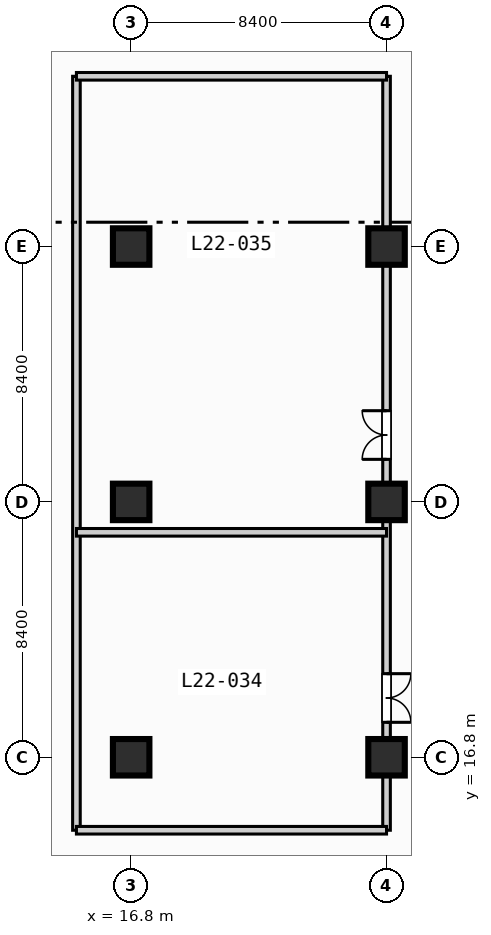
"""IFC4 building model, lengths in metres.
Left out: names, types, materials, properties, quantities, classifications, styles, units other than length and angle.
Written with IfcOpenShell. Run it as: python <this file> out.ifc"""

import sys

from ifc_helpers import new_model, si_unit, direction, frame, frame_2d, origin, origin_2d, place, context, subcontext, project, spatial, rectangle, extrude, element, fill, save


model = new_model("IFC4")
c1 = context("Model", 3, precision=1e-05, world=origin(), true_north=direction((0.0, 1.0)))
c2 = subcontext(c1, "Body", "Model", "MODEL_VIEW")
j1 = project(units=[si_unit("LENGTHUNIT", "METRE"), si_unit("PLANEANGLEUNIT", "RADIAN")], contexts=[c1])
p1 = place(None, origin())
s1 = spatial("IfcSite", under=j1, at=p1, CompositionType="ELEMENT")
p2 = place(p1, origin())
s2 = spatial("IfcBuilding", under=s1, at=p2, CompositionType="ELEMENT")
p3 = place(p2, frame((0.0, 0.0, 94.0)))
s3 = spatial("IfcBuildingStorey", under=s2, at=p3, CompositionType="ELEMENT", Elevation=94.0)
for number, where, z_axis, x_axis in (
    (1, (16.8, 16.8, 0.0), (0.0, 0.0, 1.0), (1.0, 0.0, 0.0)),
    (2, (16.8, 25.2, 0.0), (0.0, 0.0, 1.0), (1.0, 0.0, 0.0)),
    (3, (16.8, 33.6, 0.0), (0.0, 0.0, 1.0), (1.0, 0.0, 0.0)),
    (4, (25.2, 16.8, 0.0), (0.0, 0.0, 1.0), (1.0, 0.0, 0.0)),
    (5, (25.2, 25.2, 0.0), (0.0, 0.0, 1.0), (1.0, 0.0, 0.0)),
    (6, (25.2, 33.6, 0.0), (0.0, 0.0, 1.0), (1.0, 0.0, 0.0)),
):
    element("IfcColumn", number, at=place(p3, frame(where, z_axis=z_axis, x_axis=x_axis)), inside=s3, PredefinedType="COLUMN", context=c2, shape_type="SweptSolid", body=[
        extrude(rectangle(XDim=1.2, YDim=1.2, at=origin_2d()), origin(), (0.0, 0.0, 1.0), 6.0),
    ])
p4 = place(p3, frame((25.2, 14.4, 0.0), z_axis=(0.0, 0.0, 1.0), x_axis=(0.0, 1.0, 0.0)))
e7 = element("IfcWall", 7, at=p4, inside=s3, PredefinedType="SOLIDWALL", context=c2, shape_type="SweptSolid", body=[
    extrude(rectangle(XDim=24.8, YDim=0.25, at=frame_2d((12.4, 0.0))), origin(), (0.0, 0.0, 1.0), 5.0),
])
p5 = place(p4, frame((3.55, 0.0, 0.0)))
e8 = element("IfcOpeningElement", 8, at=p5, cuts=e7, PredefinedType="OPENING", context=c2, shape_type="SweptSolid", body=[
    extrude(rectangle(XDim=1.6, YDim=2.2, at=frame_2d((0.8, 1.1))), frame((0.0, 0.135, 0.0), z_axis=(0.0, -1.0, 0.0), x_axis=(1.0, 0.0, 0.0)), (0.0, 0.0, 1.0), 0.27),
])
p6 = place(p4, frame((12.2, 0.0, 0.0)))
e9 = element("IfcOpeningElement", 9, at=p6, cuts=e7, PredefinedType="OPENING", context=c2, shape_type="SweptSolid", body=[
    extrude(rectangle(XDim=1.6, YDim=2.2, at=frame_2d((0.8, 1.1))), frame((0.0, 0.135, 0.0), z_axis=(0.0, -1.0, 0.0), x_axis=(1.0, 0.0, 0.0)), (0.0, 0.0, 1.0), 0.27),
])
p7 = place(p3, frame((15.0, 14.4, 0.0), z_axis=(0.0, 0.0, 1.0), x_axis=(0.0, 1.0, 0.0)))
e10 = element("IfcWall", 10, at=p7, inside=s3, PredefinedType="SOLIDWALL", context=c2, shape_type="SweptSolid", body=[
    extrude(rectangle(XDim=24.8, YDim=0.25, at=frame_2d((12.4, 0.0))), origin(), (0.0, 0.0, 1.0), 5.75),
])
for number, where, z_axis, x_axis in (
    (11, (15.0, 14.4, 0.0), (0.0, 0.0, 1.0), (1.0, 0.0, 0.0)),
    (12, (15.0, 39.2, 0.0), (0.0, 0.0, 1.0), (1.0, 0.0, 0.0)),
    (13, (15.0, 24.2, 0.0), (0.0, 0.0, 1.0), (1.0, 0.0, 0.0)),
):
    element("IfcWall", number, at=place(p3, frame(where, z_axis=z_axis, x_axis=x_axis)), inside=s3, PredefinedType="SOLIDWALL", context=c2, shape_type="SweptSolid", body=[
        extrude(rectangle(XDim=10.2, YDim=0.25, at=frame_2d((5.1, 0.0))), origin(), (0.0, 0.0, 1.0), 5.75),
    ])
p8 = place(p5, origin())
e14 = element("IfcDoor", 14, at=p8, inside=s3, OperationType="SINGLE_SWING_RIGHT", PredefinedType="DOOR", context=c2, shape_type="SweptSolid", body=[
    extrude(rectangle(XDim=1.6, YDim=2.2, at=frame_2d((0.8, 1.1))), frame((0.0, 0.025, 0.0), z_axis=(0.0, -1.0, 0.0), x_axis=(1.0, 0.0, 0.0)), (0.0, 0.0, 1.0), 0.05),
])
fill(e8, e14)
p9 = place(p6, origin())
e15 = element("IfcDoor", 15, at=p9, inside=s3, OperationType="SINGLE_SWING_LEFT", PredefinedType="DOOR", context=c2, shape_type="SweptSolid", body=[
    extrude(rectangle(XDim=1.6, YDim=2.2, at=frame_2d((0.8, 1.1))), frame((0.0, 0.025, 0.0), z_axis=(0.0, -1.0, 0.0), x_axis=(1.0, 0.0, 0.0)), (0.0, 0.0, 1.0), 0.05),
])
fill(e9, e15)
save(model, sys.argv[1])
